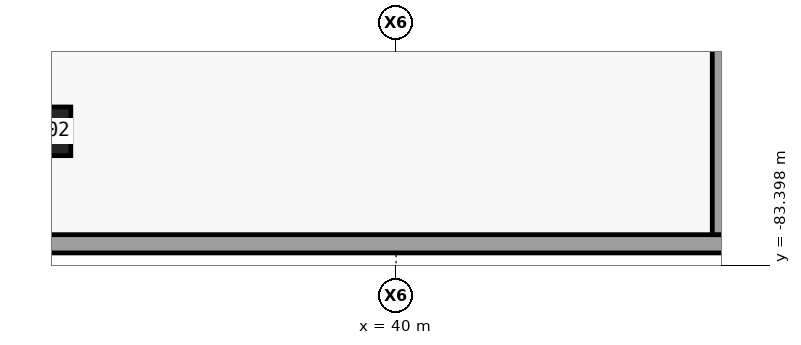
"""IFC4 building model, lengths in metres.
Left out: names, types, materials, properties, quantities, classifications, styles, units other than length and angle.
Written with IfcOpenShell. Run it as: python <this file> out.ifc"""

import sys

from ifc_helpers import new_model, si_unit, direction, frame, origin, origin_2d, place, context, subcontext, project, spatial, polyline, rectangle, outline, extrude, element, save


model = new_model("IFC4")
c1 = context("Model", 3, precision=1e-05, world=origin(), true_north=direction((0.0, 1.0)))
c2 = subcontext(c1, "Body", "Model", "MODEL_VIEW")
j1 = project(units=[si_unit("LENGTHUNIT", "METRE"), si_unit("PLANEANGLEUNIT", "RADIAN")], contexts=[c1])
p1 = place(None, origin())
s1 = spatial("IfcSite", under=j1, at=p1, CompositionType="ELEMENT")
p2 = place(p1, origin())
s2 = spatial("IfcBuilding", under=s1, at=p2, CompositionType="ELEMENT")
p3 = place(p2, frame((0.0, 0.0, -4.5)))
s3 = spatial("IfcBuildingStorey", under=s2, at=p3, CompositionType="ELEMENT", Elevation=-4.5)
p4 = place(p3, frame((-51.0, -82.7, 0.0), z_axis=(0.0, 0.0, 1.0), x_axis=(1.0, 0.0, 0.0)))
e1 = element("IfcWall", 1, at=p4, inside=s3, PredefinedType="SOLIDWALL", context=c2, shape_type="SweptSolid", body=[
    extrude(outline(polyline([(0.0, -0.3), (0.0, 0.3), (0.6, 0.3), (101.4, 0.3), (102.0, 0.3), (102.0, -0.3), (0.0, -0.3)])), origin(), (0.0, 0.0, 1.0), 4.5),
])
p5 = place(p3, frame((50.7, -83.0, 0.0), z_axis=(0.0, 0.0, 1.0), x_axis=(0.0, 1.0, 0.0)))
e2 = element("IfcWall", 2, at=p5, inside=s3, PredefinedType="SOLIDWALL", context=c2, shape_type="SweptSolid", body=[
    extrude(outline(polyline([(0.6, -0.3), (0.6, 0.3), (81.4, 0.3), (82.0, 0.3), (82.0, -0.3), (0.6, -0.3)])), origin(), (0.0, 0.0, 1.0), 4.5),
])
p6 = place(p3, frame((28.5, -79.0, 0.0), z_axis=(0.0, 0.0, 1.0), x_axis=(1.0, 0.0, 0.0)))
e3 = element("IfcColumn", 3, at=p6, inside=s3, PredefinedType="COLUMN", context=c2, shape_type="SweptSolid", body=[
    extrude(rectangle(XDim=1.6, YDim=1.6, at=origin_2d()), origin(), (0.0, 0.0, 1.0), 4.5),
])
save(model, sys.argv[1])
